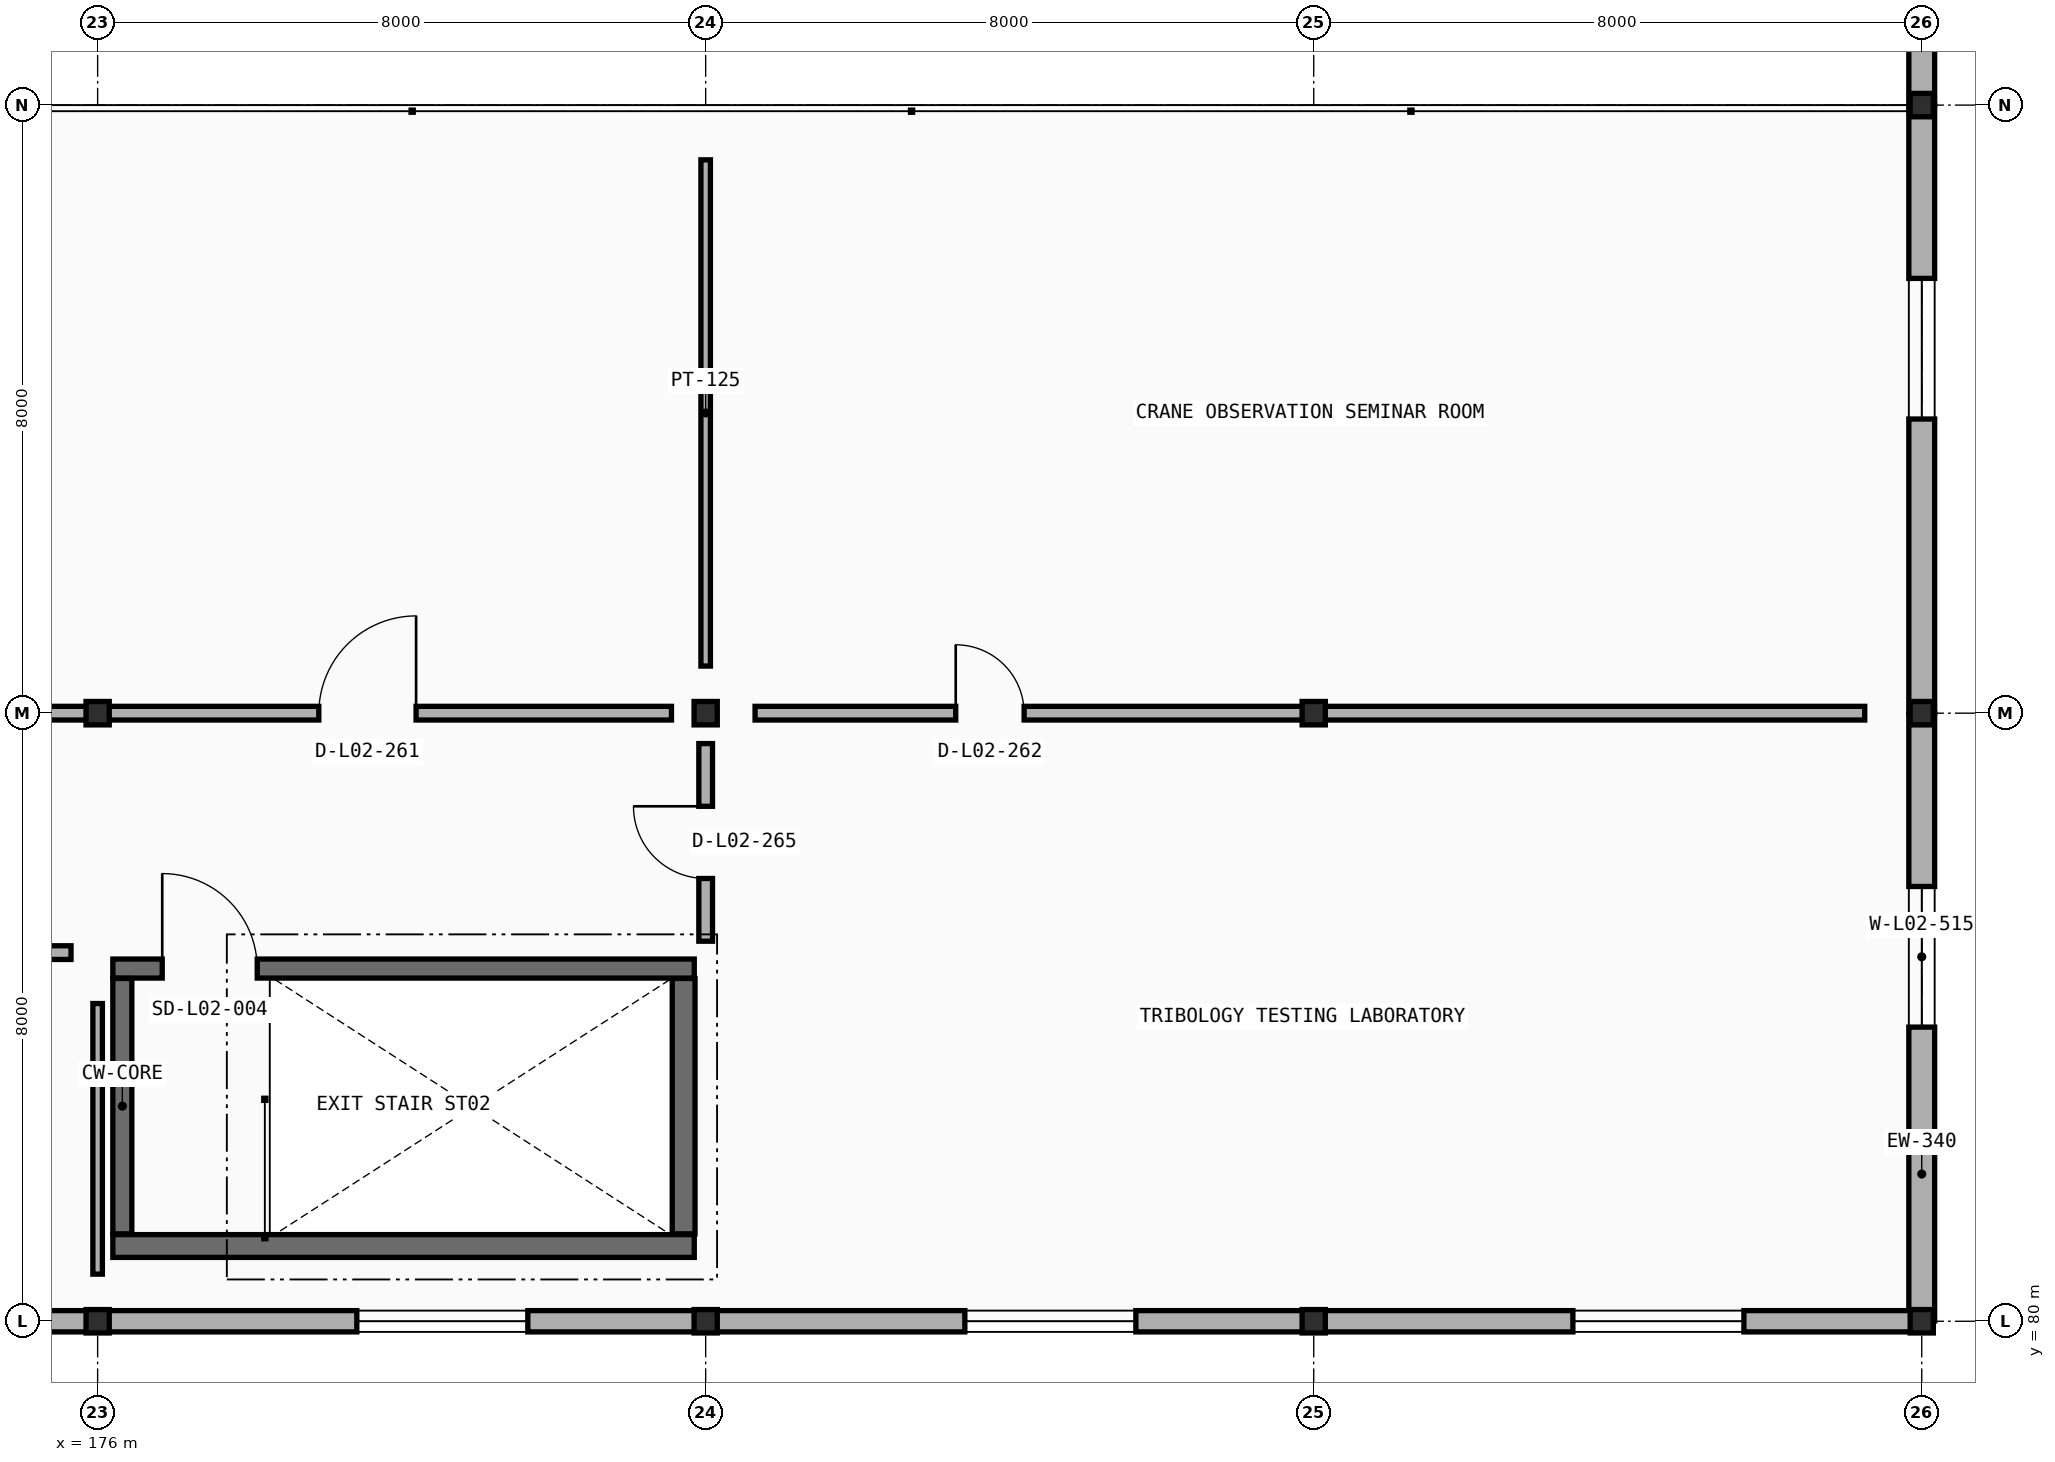
"""IFC4 building model, lengths in metres.
Left out: names, types, materials, properties, quantities, classifications, styles, units other than length and angle.
Written with IfcOpenShell. Run it as: python <this file> out.ifc"""

import sys

from ifc_helpers import new_model, si_unit, direction, frame, frame_2d, origin, origin_2d, place, context, subcontext, project, spatial, rectangle, i_section, extrude, element, fill, save


model = new_model("IFC4")
c1 = context("Model", 3, precision=1e-05, world=origin(), true_north=direction((0.0, 1.0)))
c2 = subcontext(c1, "Body", "Model", "MODEL_VIEW")
j1 = project(units=[si_unit("LENGTHUNIT", "METRE"), si_unit("PLANEANGLEUNIT", "RADIAN")], contexts=[c1])
p1 = place(None, origin())
s1 = spatial("IfcSite", under=j1, at=p1, CompositionType="ELEMENT")
p2 = place(p1, origin())
s2 = spatial("IfcBuilding", under=s1, at=p2, CompositionType="ELEMENT")
p3 = place(p2, frame((0.0, 0.0, 4.8)))
s3 = spatial("IfcBuildingStorey", under=s2, at=p3, CompositionType="ELEMENT", Elevation=4.8)
for number, where, z_axis, x_axis in (
    (1, (176.0, 80.0, 0.0), (0.0, 0.0, 1.0), (1.0, 0.0, 0.0)),
    (2, (184.0, 80.0, 0.0), (0.0, 0.0, 1.0), (1.0, 0.0, 0.0)),
    (3, (192.0, 80.0, 0.0), (0.0, 0.0, 1.0), (1.0, 0.0, 0.0)),
    (4, (200.0, 80.0, 0.0), (0.0, 0.0, 1.0), (1.0, 0.0, 0.0)),
    (5, (176.0, 88.0, 0.0), (0.0, 0.0, 1.0), (1.0, 0.0, 0.0)),
    (6, (184.0, 88.0, 0.0), (0.0, 0.0, 1.0), (1.0, 0.0, 0.0)),
    (7, (192.0, 88.0, 0.0), (0.0, 0.0, 1.0), (1.0, 0.0, 0.0)),
    (8, (200.0, 88.0, 0.0), (0.0, 0.0, 1.0), (1.0, 0.0, 0.0)),
    (9, (200.0, 96.0, 0.0), (0.0, 0.0, 1.0), (1.0, 0.0, 0.0)),
):
    element("IfcColumn", number, at=place(p3, frame(where, z_axis=z_axis, x_axis=x_axis)), inside=s3, PredefinedType="COLUMN", context=c2, shape_type="SweptSolid", body=[
        extrude(i_section(OverallWidth=0.305, OverallDepth=0.308, WebThickness=0.01, FlangeThickness=0.015, FilletRadius=0.015, at=origin_2d()), origin(), (0.0, 0.0, 1.0), 5.15),
    ])
p4 = place(p3, frame((200.0, 87.996, 0.0), z_axis=(0.0, 0.0, 1.0), x_axis=(0.0, -1.0, 0.0)))
e10 = element("IfcWall", 10, at=p4, inside=s3, PredefinedType="STANDARD", context=c2, shape_type="SweptSolid", body=[
    extrude(rectangle(XDim=7.992, YDim=0.34, at=frame_2d((3.996, 0.0))), origin(), (0.0, 0.0, 1.0), 3.815),
])
p5 = place(p4, frame((2.276, 0.0, 1.2)))
e11 = element("IfcOpeningElement", 11, at=p5, cuts=e10, PredefinedType="OPENING", context=c2, shape_type="SweptSolid", body=[
    extrude(rectangle(XDim=1.85, YDim=2.0, at=frame_2d((0.925, 1.0))), frame((0.0, 0.18, 0.0), z_axis=(0.0, -1.0, 0.0), x_axis=(1.0, 0.0, 0.0)), (0.0, 0.0, 1.0), 0.36),
])
p6 = place(p3, frame((200.0, 95.996, 0.0), z_axis=(0.0, 0.0, 1.0), x_axis=(0.0, -1.0, 0.0)))
e12 = element("IfcWall", 12, at=p6, inside=s3, PredefinedType="STANDARD", context=c2, shape_type="SweptSolid", body=[
    extrude(rectangle(XDim=7.992, YDim=0.34, at=frame_2d((3.996, 0.0))), origin(), (0.0, 0.0, 1.0), 4.92),
])
p7 = place(p6, frame((2.276, 0.0, 1.2)))
e13 = element("IfcOpeningElement", 13, at=p7, cuts=e12, PredefinedType="OPENING", context=c2, shape_type="SweptSolid", body=[
    extrude(rectangle(XDim=1.85, YDim=2.0, at=frame_2d((0.925, 1.0))), frame((0.0, 0.18, 0.0), z_axis=(0.0, -1.0, 0.0), x_axis=(1.0, 0.0, 0.0)), (0.0, 0.0, 1.0), 0.36),
])
p8 = place(p3, frame((200.0, 103.996, 0.0), z_axis=(0.0, 0.0, 1.0), x_axis=(0.0, -1.0, 0.0)))
e14 = element("IfcWall", 14, at=p8, inside=s3, PredefinedType="STANDARD", context=c2, shape_type="SweptSolid", body=[
    extrude(rectangle(XDim=7.992, YDim=0.34, at=frame_2d((3.996, 0.0))), origin(), (0.0, 0.0, 1.0), 4.92),
])
p9 = place(p8, frame((2.276, 0.0, 1.2)))
e15 = element("IfcOpeningElement", 15, at=p9, cuts=e14, PredefinedType="OPENING", context=c2, shape_type="SweptSolid", body=[
    extrude(rectangle(XDim=1.85, YDim=2.0, at=frame_2d((0.925, 1.0))), frame((0.0, 0.18, 0.0), z_axis=(0.0, -1.0, 0.0), x_axis=(1.0, 0.0, 0.0)), (0.0, 0.0, 1.0), 0.36),
])
p10 = place(p3, frame((175.996, 80.0, 0.0), z_axis=(0.0, 0.0, 1.0), x_axis=(-1.0, 0.0, 0.0)))
e16 = element("IfcWall", 16, at=p10, inside=s3, PredefinedType="STANDARD", context=c2, shape_type="SweptSolid", body=[
    extrude(rectangle(XDim=7.992, YDim=0.28, at=frame_2d((3.996, 0.0))), origin(), (0.0, 0.0, 1.0), 3.965),
])
p11 = place(p10, frame((2.336, 0.0, 0.95)))
e17 = element("IfcOpeningElement", 17, at=p11, cuts=e16, PredefinedType="OPENING", context=c2, shape_type="SweptSolid", body=[
    extrude(rectangle(XDim=2.25, YDim=2.0, at=frame_2d((1.125, 1.0))), frame((0.0, 0.15, 0.0), z_axis=(0.0, -1.0, 0.0), x_axis=(1.0, 0.0, 0.0)), (0.0, 0.0, 1.0), 0.3),
])
p12 = place(p3, frame((183.996, 80.0, 0.0), z_axis=(0.0, 0.0, 1.0), x_axis=(-1.0, 0.0, 0.0)))
e18 = element("IfcWall", 18, at=p12, inside=s3, PredefinedType="STANDARD", context=c2, shape_type="SweptSolid", body=[
    extrude(rectangle(XDim=7.992, YDim=0.28, at=frame_2d((3.996, 0.0))), origin(), (0.0, 0.0, 1.0), 3.965),
])
p13 = place(p12, frame((2.336, 0.0, 0.95)))
e19 = element("IfcOpeningElement", 19, at=p13, cuts=e18, PredefinedType="OPENING", context=c2, shape_type="SweptSolid", body=[
    extrude(rectangle(XDim=2.25, YDim=2.0, at=frame_2d((1.125, 1.0))), frame((0.0, 0.15, 0.0), z_axis=(0.0, -1.0, 0.0), x_axis=(1.0, 0.0, 0.0)), (0.0, 0.0, 1.0), 0.3),
])
p14 = place(p3, frame((191.996, 80.0, 0.0), z_axis=(0.0, 0.0, 1.0), x_axis=(-1.0, 0.0, 0.0)))
e20 = element("IfcWall", 20, at=p14, inside=s3, PredefinedType="STANDARD", context=c2, shape_type="SweptSolid", body=[
    extrude(rectangle(XDim=7.992, YDim=0.28, at=frame_2d((3.996, 0.0))), origin(), (0.0, 0.0, 1.0), 3.965),
])
p15 = place(p14, frame((2.336, 0.0, 0.95)))
e21 = element("IfcOpeningElement", 21, at=p15, cuts=e20, PredefinedType="OPENING", context=c2, shape_type="SweptSolid", body=[
    extrude(rectangle(XDim=2.25, YDim=2.0, at=frame_2d((1.125, 1.0))), frame((0.0, 0.15, 0.0), z_axis=(0.0, -1.0, 0.0), x_axis=(1.0, 0.0, 0.0)), (0.0, 0.0, 1.0), 0.3),
])
p16 = place(p3, frame((199.996, 80.0, 0.0), z_axis=(0.0, 0.0, 1.0), x_axis=(-1.0, 0.0, 0.0)))
e22 = element("IfcWall", 22, at=p16, inside=s3, PredefinedType="STANDARD", context=c2, shape_type="SweptSolid", body=[
    extrude(rectangle(XDim=7.992, YDim=0.28, at=frame_2d((3.996, 0.0))), origin(), (0.0, 0.0, 1.0), 3.965),
])
p17 = place(p16, frame((2.336, 0.0, 0.95)))
e23 = element("IfcOpeningElement", 23, at=p17, cuts=e22, PredefinedType="OPENING", context=c2, shape_type="SweptSolid", body=[
    extrude(rectangle(XDim=2.25, YDim=2.0, at=frame_2d((1.125, 1.0))), frame((0.0, 0.15, 0.0), z_axis=(0.0, -1.0, 0.0), x_axis=(1.0, 0.0, 0.0)), (0.0, 0.0, 1.0), 0.3),
])
p18 = place(p3, frame((176.2, 80.99, 0.0), z_axis=(0.0, 0.0, 1.0), x_axis=(1.0, 0.0, 0.0)))
e24 = element("IfcWall", 24, at=p18, inside=s3, PredefinedType="SHEAR", context=c2, shape_type="SweptSolid", body=[
    extrude(rectangle(XDim=7.65, YDim=0.3, at=frame_2d((3.825, 0.0))), origin(), (0.0, 0.0, 1.0), 4.8),
])
p19 = place(p3, frame((183.71, 81.15, 0.0), z_axis=(0.0, 0.0, 1.0), x_axis=(0.0, 1.0, 0.0)))
e25 = element("IfcWall", 25, at=p19, inside=s3, PredefinedType="SHEAR", context=c2, shape_type="SweptSolid", body=[
    extrude(rectangle(XDim=3.36, YDim=0.3, at=frame_2d((1.68, 0.0))), origin(), (0.0, 0.0, 1.0), 4.8),
])
p20 = place(p3, frame((176.2, 84.64, 0.0), z_axis=(0.0, 0.0, 1.0), x_axis=(1.0, 0.0, 0.0)))
e26 = element("IfcWall", 26, at=p20, inside=s3, PredefinedType="SOLIDWALL", context=c2, shape_type="SweptSolid", body=[
    extrude(rectangle(XDim=7.65, YDim=0.25, at=frame_2d((3.825, 0.0))), origin(), (0.0, 0.0, 1.0), 4.8),
])
p21 = place(p20, frame((0.65, 0.0, 0.0)))
e27 = element("IfcOpeningElement", 27, at=p21, cuts=e26, PredefinedType="OPENING", context=c2, shape_type="SweptSolid", body=[
    extrude(rectangle(XDim=1.25, YDim=2.15, at=frame_2d((0.625, 1.075))), frame((0.0, 0.135, 0.0), z_axis=(0.0, -1.0, 0.0), x_axis=(1.0, 0.0, 0.0)), (0.0, 0.0, 1.0), 0.27),
])
p22 = place(p3, frame((176.325, 81.15, 0.0), z_axis=(0.0, 0.0, 1.0), x_axis=(0.0, 1.0, 0.0)))
e28 = element("IfcWall", 28, at=p22, inside=s3, PredefinedType="SOLIDWALL", context=c2, shape_type="SweptSolid", body=[
    extrude(rectangle(XDim=3.36, YDim=0.25, at=frame_2d((1.68, 0.0))), origin(), (0.0, 0.0, 1.0), 4.8),
])
p23 = place(p3, frame((136.65, 88.0, 0.0), z_axis=(0.0, 0.0, 1.0), x_axis=(1.0, 0.0, 0.0)))
e29 = element("IfcWall", 29, at=p23, inside=s3, PredefinedType="PARTITIONING", context=c2, shape_type="SweptSolid", body=[
    extrude(rectangle(XDim=46.9, YDim=0.18, at=frame_2d((23.45, 0.0))), origin(), (0.0, 0.0, 1.0), 3.887),
])
p24 = place(p23, frame((2.71, 0.0, 0.0)))
e30 = element("IfcOpeningElement", 30, at=p24, cuts=e29, PredefinedType="OPENING", context=c2, shape_type="SweptSolid", body=[
    extrude(rectangle(XDim=1.28, YDim=2.2, at=frame_2d((0.64, 1.1))), frame((0.0, 0.1, 0.0), z_axis=(0.0, -1.0, 0.0), x_axis=(1.0, 0.0, 0.0)), (0.0, 0.0, 1.0), 0.2),
])
p25 = place(p23, frame((42.26, 0.0, 0.0)))
e31 = element("IfcOpeningElement", 31, at=p25, cuts=e29, PredefinedType="OPENING", context=c2, shape_type="SweptSolid", body=[
    extrude(rectangle(XDim=1.28, YDim=2.2, at=frame_2d((0.64, 1.1))), frame((0.0, 0.1, 0.0), z_axis=(0.0, -1.0, 0.0), x_axis=(1.0, 0.0, 0.0)), (0.0, 0.0, 1.0), 0.2),
])
p26 = place(p3, frame((184.0, 88.62, 0.0), z_axis=(0.0, 0.0, 1.0), x_axis=(0.0, 1.0, 0.0)))
e32 = element("IfcWall", 32, at=p26, inside=s3, PredefinedType="PARTITIONING", context=c2, shape_type="SweptSolid", body=[
    extrude(rectangle(XDim=6.66, YDim=0.125, at=frame_2d((3.33, 0.0))), origin(), (0.0, 0.0, 1.0), 3.9),
])
p27 = place(p3, frame((184.65, 88.0, 0.0), z_axis=(0.0, 0.0, 1.0), x_axis=(1.0, 0.0, 0.0)))
e33 = element("IfcWall", 33, at=p27, inside=s3, PredefinedType="PARTITIONING", context=c2, shape_type="SweptSolid", body=[
    extrude(rectangle(XDim=14.6, YDim=0.18, at=frame_2d((7.3, 0.0))), origin(), (0.0, 0.0, 1.0), 2.175),
])
p28 = place(p27, frame((2.64, 0.0, 0.0)))
e34 = element("IfcOpeningElement", 34, at=p28, cuts=e33, PredefinedType="OPENING", context=c2, shape_type="SweptSolid", body=[
    extrude(rectangle(XDim=0.9, YDim=2.1, at=frame_2d((0.45, 1.05))), frame((0.0, 0.1, 0.0), z_axis=(0.0, -1.0, 0.0), x_axis=(1.0, 0.0, 0.0)), (0.0, 0.0, 1.0), 0.2),
])
p29 = place(p3, frame((144.55, 84.85, 0.0), z_axis=(0.0, 0.0, 1.0), x_axis=(1.0, 0.0, 0.0)))
e35 = element("IfcWall", 35, at=p29, inside=s3, PredefinedType="PARTITIONING", context=c2, shape_type="SweptSolid", body=[
    extrude(rectangle(XDim=31.1, YDim=0.18, at=frame_2d((15.55, 0.0))), origin(), (0.0, 0.0, 1.0), 3.9),
])
p30 = place(p29, frame((2.61, 0.0, 0.0)))
e36 = element("IfcOpeningElement", 36, at=p30, cuts=e35, PredefinedType="OPENING", context=c2, shape_type="SweptSolid", body=[
    extrude(rectangle(XDim=1.68, YDim=2.25, at=frame_2d((0.84, 1.125))), frame((0.0, 0.1, 0.0), z_axis=(0.0, -1.0, 0.0), x_axis=(1.0, 0.0, 0.0)), (0.0, 0.0, 1.0), 0.2),
])
p31 = place(p3, frame((176.0, 80.62, 0.0), z_axis=(0.0, 0.0, 1.0), x_axis=(0.0, 1.0, 0.0)))
e37 = element("IfcWall", 37, at=p31, inside=s3, PredefinedType="PARTITIONING", context=c2, shape_type="SweptSolid", body=[
    extrude(rectangle(XDim=3.56, YDim=0.125, at=frame_2d((1.78, 0.0))), origin(), (0.0, 0.0, 1.0), 3.815),
])
p32 = place(p3, frame((184.0, 85.0, 0.0), z_axis=(0.0, 0.0, 1.0), x_axis=(0.0, 1.0, 0.0)))
e38 = element("IfcWall", 38, at=p32, inside=s3, PredefinedType="PARTITIONING", context=c2, shape_type="SweptSolid", body=[
    extrude(rectangle(XDim=2.6, YDim=0.18, at=frame_2d((1.3, 0.0))), origin(), (0.0, 0.0, 1.0), 3.815),
])
p33 = place(p32, frame((0.825, 0.0, 0.0)))
e39 = element("IfcOpeningElement", 39, at=p33, cuts=e38, PredefinedType="OPENING", context=c2, shape_type="SweptSolid", body=[
    extrude(rectangle(XDim=0.95, YDim=2.1, at=frame_2d((0.475, 1.05))), frame((0.0, 0.1, 0.0), z_axis=(0.0, -1.0, 0.0), x_axis=(1.0, 0.0, 0.0)), (0.0, 0.0, 1.0), 0.2),
])
p34 = place(p5, origin())
e40 = element("IfcWindow", 40, at=p34, inside=s3, PartitioningType="DOUBLE_PANEL_VERTICAL", PredefinedType="WINDOW", context=c2, shape_type="SweptSolid", body=[
    extrude(rectangle(XDim=1.85, YDim=2.0, at=frame_2d((0.925, 1.0))), frame((0.0, 0.03, 0.0), z_axis=(0.0, -1.0, 0.0), x_axis=(1.0, 0.0, 0.0)), (0.0, 0.0, 1.0), 0.06),
])
fill(e11, e40)
p35 = place(p7, origin())
e41 = element("IfcWindow", 41, at=p35, inside=s3, PartitioningType="DOUBLE_PANEL_VERTICAL", PredefinedType="WINDOW", context=c2, shape_type="SweptSolid", body=[
    extrude(rectangle(XDim=1.85, YDim=2.0, at=frame_2d((0.925, 1.0))), frame((0.0, 0.03, 0.0), z_axis=(0.0, -1.0, 0.0), x_axis=(1.0, 0.0, 0.0)), (0.0, 0.0, 1.0), 0.06),
])
fill(e13, e41)
p36 = place(p13, origin())
e42 = element("IfcWindow", 42, at=p36, inside=s3, PartitioningType="DOUBLE_PANEL_VERTICAL", PredefinedType="WINDOW", context=c2, shape_type="SweptSolid", body=[
    extrude(rectangle(XDim=2.25, YDim=2.0, at=frame_2d((1.125, 1.0))), frame((0.0, 0.03, 0.0), z_axis=(0.0, -1.0, 0.0), x_axis=(1.0, 0.0, 0.0)), (0.0, 0.0, 1.0), 0.06),
])
fill(e19, e42)
p37 = place(p15, origin())
e43 = element("IfcWindow", 43, at=p37, inside=s3, PartitioningType="DOUBLE_PANEL_VERTICAL", PredefinedType="WINDOW", context=c2, shape_type="SweptSolid", body=[
    extrude(rectangle(XDim=2.25, YDim=2.0, at=frame_2d((1.125, 1.0))), frame((0.0, 0.03, 0.0), z_axis=(0.0, -1.0, 0.0), x_axis=(1.0, 0.0, 0.0)), (0.0, 0.0, 1.0), 0.06),
])
fill(e21, e43)
p38 = place(p17, origin())
e44 = element("IfcWindow", 44, at=p38, inside=s3, PartitioningType="DOUBLE_PANEL_VERTICAL", PredefinedType="WINDOW", context=c2, shape_type="SweptSolid", body=[
    extrude(rectangle(XDim=2.25, YDim=2.0, at=frame_2d((1.125, 1.0))), frame((0.0, 0.03, 0.0), z_axis=(0.0, -1.0, 0.0), x_axis=(1.0, 0.0, 0.0)), (0.0, 0.0, 1.0), 0.06),
])
fill(e23, e44)
p39 = place(p21, origin())
e45 = element("IfcDoor", 45, at=p39, inside=s3, OperationType="SINGLE_SWING_LEFT", PredefinedType="DOOR", context=c2, shape_type="SweptSolid", body=[
    extrude(rectangle(XDim=1.25, YDim=2.15, at=frame_2d((0.625, 1.075))), frame((0.0, 0.025, 0.0), z_axis=(0.0, -1.0, 0.0), x_axis=(1.0, 0.0, 0.0)), (0.0, 0.0, 1.0), 0.05),
])
fill(e27, e45)
p40 = place(p25, origin())
e46 = element("IfcDoor", 46, at=p40, inside=s3, OperationType="SINGLE_SWING_RIGHT", PredefinedType="DOOR", context=c2, shape_type="SweptSolid", body=[
    extrude(rectangle(XDim=1.28, YDim=2.2, at=frame_2d((0.64, 1.1))), frame((0.0, 0.025, 0.0), z_axis=(0.0, -1.0, 0.0), x_axis=(1.0, 0.0, 0.0)), (0.0, 0.0, 1.0), 0.05),
])
fill(e31, e46)
p41 = place(p28, origin())
e47 = element("IfcDoor", 47, at=p41, inside=s3, OperationType="SINGLE_SWING_LEFT", PredefinedType="DOOR", context=c2, shape_type="SweptSolid", body=[
    extrude(rectangle(XDim=0.9, YDim=2.1, at=frame_2d((0.45, 1.05))), frame((0.0, 0.025, 0.0), z_axis=(0.0, -1.0, 0.0), x_axis=(1.0, 0.0, 0.0)), (0.0, 0.0, 1.0), 0.05),
])
fill(e34, e47)
p42 = place(p33, origin())
e48 = element("IfcDoor", 48, at=p42, inside=s3, OperationType="SINGLE_SWING_RIGHT", PredefinedType="DOOR", context=c2, shape_type="SweptSolid", body=[
    extrude(rectangle(XDim=0.95, YDim=2.1, at=frame_2d((0.475, 1.05))), frame((0.0, 0.025, 0.0), z_axis=(0.0, -1.0, 0.0), x_axis=(1.0, 0.0, 0.0)), (0.0, 0.0, 1.0), 0.05),
])
fill(e39, e48)
save(model, sys.argv[1])
